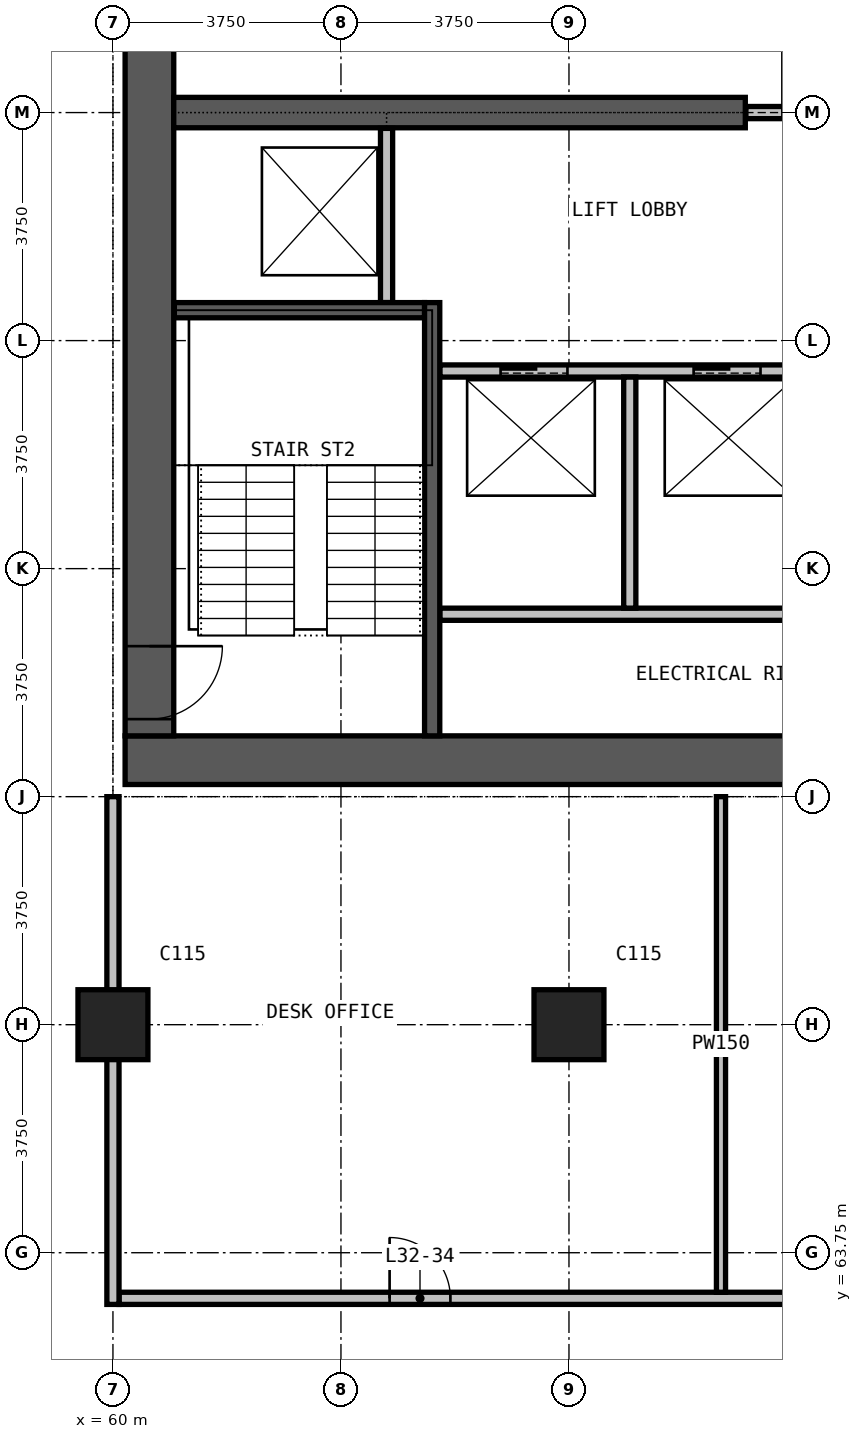
"""IFC4 building model, lengths in metres.
Left out: names, types, materials, properties, quantities, classifications, styles, units other than length and angle.
Written with IfcOpenShell. Run it as: python <this file> out.ifc"""

import sys

from ifc_helpers import new_model, si_unit, direction, frame, frame_2d, origin, origin_2d, place, context, subcontext, project, spatial, rectangle, extrude, element, fill, save


model = new_model("IFC4")
c1 = context("Model", 3, precision=1e-05, world=origin(), true_north=direction((0.0, 1.0)))
c2 = subcontext(c1, "Body", "Model", "MODEL_VIEW")
j1 = project(units=[si_unit("LENGTHUNIT", "METRE"), si_unit("PLANEANGLEUNIT", "RADIAN")], contexts=[c1])
p1 = place(None, origin())
s1 = spatial("IfcSite", under=j1, at=p1, CompositionType="ELEMENT")
p2 = place(p1, origin())
s2 = spatial("IfcBuilding", under=s1, at=p2, CompositionType="ELEMENT")
p3 = place(p2, frame((0.0, 0.0, 128.8)))
s3 = spatial("IfcBuildingStorey", under=s2, at=p3, CompositionType="ELEMENT", Elevation=128.8)
for number, where, z_axis, x_axis in (
    (1, (60.0, 67.5, 0.0), (0.0, 0.0, 1.0), (1.0, 0.0, 0.0)),
    (2, (67.5, 67.5, 0.0), (0.0, 0.0, 1.0), (1.0, 0.0, 0.0)),
):
    element("IfcColumn", number, at=place(p3, frame(where, z_axis=z_axis, x_axis=x_axis)), inside=s3, PredefinedType="COLUMN", context=c2, shape_type="SweptSolid", body=[
        extrude(rectangle(XDim=1.15, YDim=1.15, at=origin_2d()), origin(), (0.0, 0.0, 1.0), 3.6),
    ])
p4 = place(p3, frame((60.2, 71.85, 0.0), z_axis=(0.0, 0.0, 1.0), x_axis=(1.0, 0.0, 0.0)))
e3 = element("IfcWall", 3, at=p4, inside=s3, PredefinedType="SHEAR", context=c2, shape_type="SweptSolid", body=[
    extrude(rectangle(XDim=29.6, YDim=0.8, at=frame_2d((14.8, 0.0))), origin(), (0.0, 0.0, 1.0), 3.6),
])
p5 = place(p3, frame((60.6, 92.75, 0.0), z_axis=(0.0, 0.0, 1.0), x_axis=(0.0, -1.0, 0.0)))
e4 = element("IfcWall", 4, at=p5, inside=s3, PredefinedType="SHEAR", context=c2, shape_type="SweptSolid", body=[
    extrude(rectangle(XDim=20.5, YDim=0.8, at=frame_2d((10.25, 0.0))), origin(), (0.0, 0.0, 1.0), 3.6),
])
p6 = place(p5, frame((19.025, 0.0, 0.0)))
e5 = element("IfcOpeningElement", 5, at=p6, cuts=e4, PredefinedType="OPENING", context=c2, shape_type="SweptSolid", body=[
    extrude(rectangle(XDim=1.2, YDim=2.2, at=frame_2d((0.6, 1.1))), frame((0.0, 0.41, 0.0), z_axis=(0.0, -1.0, 0.0), x_axis=(1.0, 0.0, 0.0)), (0.0, 0.0, 1.0), 0.82),
])
p7 = place(p5, frame((8.025, 0.0, 0.0)))
e6 = element("IfcOpeningElement", 6, at=p7, cuts=e4, PredefinedType="OPENING", context=c2, shape_type="SweptSolid", body=[
    extrude(rectangle(XDim=1.2, YDim=2.2, at=frame_2d((0.6, 1.1))), frame((0.0, 0.41, 0.0), z_axis=(0.0, -1.0, 0.0), x_axis=(1.0, 0.0, 0.0)), (0.0, 0.0, 1.0), 0.82),
])
p8 = place(p3, frame((61.0, 82.5, 0.0), z_axis=(0.0, 0.0, 1.0), x_axis=(1.0, 0.0, 0.0)))
e7 = element("IfcWall", 7, at=p8, inside=s3, PredefinedType="SHEAR", context=c2, shape_type="SweptSolid", body=[
    extrude(rectangle(XDim=9.4, YDim=0.5, at=frame_2d((4.7, 0.0))), origin(), (0.0, 0.0, 1.0), 3.6),
])
p9 = place(p3, frame((70.41, 82.5, 0.0), z_axis=(0.0, 0.0, 1.0), x_axis=(1.0, 0.0, 0.0)))
e8 = element("IfcWall", 8, at=p9, inside=s3, PredefinedType="PARTITIONING", context=c2, shape_type="SweptSolid", body=[
    extrude(rectangle(XDim=2.38, YDim=0.2, at=frame_2d((1.19, 0.0))), origin(), (0.0, 0.0, 1.0), 2.4),
])
p10 = place(p9, frame((0.6, 0.0, 0.0)))
e9 = element("IfcOpeningElement", 9, at=p10, cuts=e8, PredefinedType="OPENING", context=c2, shape_type="SweptSolid", body=[
    extrude(rectangle(XDim=1.2, YDim=2.2, at=frame_2d((0.6, 1.1))), frame((0.0, 0.11, 0.0), z_axis=(0.0, -1.0, 0.0), x_axis=(1.0, 0.0, 0.0)), (0.0, 0.0, 1.0), 0.22),
])
p11 = place(p3, frame((60.1, 63.0, 0.0), z_axis=(0.0, 0.0, 1.0), x_axis=(1.0, 0.0, 0.0)))
e10 = element("IfcWall", 10, at=p11, inside=s3, PredefinedType="PARTITIONING", context=c2, shape_type="SweptSolid", body=[
    extrude(rectangle(XDim=29.8, YDim=0.2, at=frame_2d((14.9, 0.0))), origin(), (0.0, 0.0, 1.0), 3.3),
])
p12 = place(p11, frame((4.45, 0.0, 0.0)))
e11 = element("IfcOpeningElement", 11, at=p12, cuts=e10, PredefinedType="OPENING", context=c2, shape_type="SweptSolid", body=[
    extrude(rectangle(XDim=1.0, YDim=2.2, at=frame_2d((0.5, 1.1))), frame((0.0, 0.11, 0.0), z_axis=(0.0, -1.0, 0.0), x_axis=(1.0, 0.0, 0.0)), (0.0, 0.0, 1.0), 0.22),
])
p13 = place(p11, frame((16.05, 0.0, 0.0)))
e12 = element("IfcOpeningElement", 12, at=p13, cuts=e10, PredefinedType="OPENING", context=c2, shape_type="SweptSolid", body=[
    extrude(rectangle(XDim=1.0, YDim=2.2, at=frame_2d((0.5, 1.1))), frame((0.0, 0.11, 0.0), z_axis=(0.0, -1.0, 0.0), x_axis=(1.0, 0.0, 0.0)), (0.0, 0.0, 1.0), 0.22),
])
p14 = place(p3, frame((60.0, 62.9, 0.0), z_axis=(0.0, 0.0, 1.0), x_axis=(0.0, 1.0, 0.0)))
e13 = element("IfcWall", 13, at=p14, inside=s3, PredefinedType="PARTITIONING", context=c2, shape_type="SweptSolid", body=[
    extrude(rectangle(XDim=8.35, YDim=0.2, at=frame_2d((4.175, 0.0))), origin(), (0.0, 0.0, 1.0), 3.3),
])
p15 = place(p3, frame((70.0, 63.1, 0.0), z_axis=(0.0, 0.0, 1.0), x_axis=(0.0, 1.0, 0.0)))
e14 = element("IfcWall", 14, at=p15, inside=s3, PredefinedType="PARTITIONING", context=c2, shape_type="SweptSolid", body=[
    extrude(rectangle(XDim=8.15, YDim=0.15, at=frame_2d((4.075, 0.0))), origin(), (0.0, 0.0, 1.0), 3.3),
])
p16 = place(p3, frame((65.375, 74.25, 0.0), z_axis=(0.0, 0.0, 1.0), x_axis=(1.0, 0.0, 0.0)))
e15 = element("IfcWall", 15, at=p16, inside=s3, PredefinedType="PARTITIONING", context=c2, shape_type="SweptSolid", body=[
    extrude(rectangle(XDim=9.365, YDim=0.2, at=frame_2d((4.683, 0.0))), origin(), (0.0, 0.0, 1.0), 3.3),
])
p17 = place(p3, frame((65.375, 78.25, 0.0), z_axis=(0.0, 0.0, 1.0), x_axis=(1.0, 0.0, 0.0)))
e16 = element("IfcWall", 16, at=p17, inside=s3, PredefinedType="PARTITIONING", context=c2, shape_type="SweptSolid", body=[
    extrude(rectangle(XDim=9.365, YDim=0.2, at=frame_2d((4.683, 0.0))), origin(), (0.0, 0.0, 1.0), 3.3),
])
p18 = place(p17, frame((1.0, 0.0, 0.0)))
e17 = element("IfcOpeningElement", 17, at=p18, cuts=e16, PredefinedType="OPENING", context=c2, shape_type="SweptSolid", body=[
    extrude(rectangle(XDim=1.1, YDim=2.2, at=frame_2d((0.55, 1.1))), frame((0.0, 0.11, 0.0), z_axis=(0.0, -1.0, 0.0), x_axis=(1.0, 0.0, 0.0)), (0.0, 0.0, 1.0), 0.22),
])
p19 = place(p17, frame((4.175, 0.0, 0.0)))
e18 = element("IfcOpeningElement", 18, at=p19, cuts=e16, PredefinedType="OPENING", context=c2, shape_type="SweptSolid", body=[
    extrude(rectangle(XDim=1.1, YDim=2.2, at=frame_2d((0.55, 1.1))), frame((0.0, 0.11, 0.0), z_axis=(0.0, -1.0, 0.0), x_axis=(1.0, 0.0, 0.0)), (0.0, 0.0, 1.0), 0.22),
])
p20 = place(p17, frame((7.325, 0.0, 0.0)))
e19 = element("IfcOpeningElement", 19, at=p20, cuts=e16, PredefinedType="OPENING", context=c2, shape_type="SweptSolid", body=[
    extrude(rectangle(XDim=1.1, YDim=2.2, at=frame_2d((0.55, 1.1))), frame((0.0, 0.11, 0.0), z_axis=(0.0, -1.0, 0.0), x_axis=(1.0, 0.0, 0.0)), (0.0, 0.0, 1.0), 0.22),
])
p21 = place(p3, frame((64.5, 79.375, 0.0), z_axis=(0.0, 0.0, 1.0), x_axis=(0.0, 1.0, 0.0)))
e20 = element("IfcWall", 20, at=p21, inside=s3, PredefinedType="PARTITIONING", context=c2, shape_type="SweptSolid", body=[
    extrude(rectangle(XDim=2.865, YDim=0.2, at=frame_2d((1.433, 0.0))), origin(), (0.0, 0.0, 1.0), 3.3),
])
p22 = place(p3, frame((68.5, 74.35, 0.0), z_axis=(0.0, 0.0, 1.0), x_axis=(0.0, 1.0, 0.0)))
e21 = element("IfcWall", 21, at=p22, inside=s3, PredefinedType="PARTITIONING", context=c2, shape_type="SweptSolid", body=[
    extrude(rectangle(XDim=3.8, YDim=0.2, at=frame_2d((1.9, 0.0))), origin(), (0.0, 0.0, 1.0), 3.3),
])
p23 = place(p3, frame((61.01, 79.25, 0.0), z_axis=(0.0, 0.0, 1.0), x_axis=(1.0, 0.0, 0.0)))
e22 = element("IfcWall", 22, at=p23, inside=s3, PredefinedType="PARTITIONING", context=c2, shape_type="SweptSolid", body=[
    extrude(rectangle(XDim=4.115, YDim=0.25, at=frame_2d((2.058, 0.0))), origin(), (0.0, 0.0, 1.0), 3.3),
])
p24 = place(p3, frame((65.25, 72.25, 0.0), z_axis=(0.0, 0.0, 1.0), x_axis=(0.0, 1.0, 0.0)))
e23 = element("IfcWall", 23, at=p24, inside=s3, PredefinedType="PARTITIONING", context=c2, shape_type="SweptSolid", body=[
    extrude(rectangle(XDim=7.125, YDim=0.25, at=frame_2d((3.562, 0.0))), origin(), (0.0, 0.0, 1.0), 3.3),
])
p25 = place(p18, origin())
e24 = element("IfcDoor", 24, at=p25, inside=s3, OperationType="DOUBLE_DOOR_SLIDING", PredefinedType="DOOR", context=c2, shape_type="SweptSolid", body=[
    extrude(rectangle(XDim=1.1, YDim=2.2, at=frame_2d((0.55, 1.1))), frame((0.0, 0.025, 0.0), z_axis=(0.0, -1.0, 0.0), x_axis=(1.0, 0.0, 0.0)), (0.0, 0.0, 1.0), 0.05),
])
fill(e17, e24)
p26 = place(p19, origin())
e25 = element("IfcDoor", 25, at=p26, inside=s3, OperationType="DOUBLE_DOOR_SLIDING", PredefinedType="DOOR", context=c2, shape_type="SweptSolid", body=[
    extrude(rectangle(XDim=1.1, YDim=2.2, at=frame_2d((0.55, 1.1))), frame((0.0, 0.025, 0.0), z_axis=(0.0, -1.0, 0.0), x_axis=(1.0, 0.0, 0.0)), (0.0, 0.0, 1.0), 0.05),
])
fill(e18, e25)
p27 = place(p6, origin())
e26 = element("IfcDoor", 26, at=p27, inside=s3, OperationType="SINGLE_SWING_LEFT", PredefinedType="DOOR", context=c2, shape_type="SweptSolid", body=[
    extrude(rectangle(XDim=1.2, YDim=2.2, at=frame_2d((0.6, 1.1))), frame((0.0, 0.025, 0.0), z_axis=(0.0, -1.0, 0.0), x_axis=(1.0, 0.0, 0.0)), (0.0, 0.0, 1.0), 0.05),
])
fill(e5, e26)
p28 = place(p12, origin())
e27 = element("IfcDoor", 27, at=p28, inside=s3, OperationType="SINGLE_SWING_LEFT", PredefinedType="DOOR", context=c2, shape_type="SweptSolid", body=[
    extrude(rectangle(XDim=1.0, YDim=2.2, at=frame_2d((0.5, 1.1))), frame((0.0, 0.025, 0.0), z_axis=(0.0, -1.0, 0.0), x_axis=(1.0, 0.0, 0.0)), (0.0, 0.0, 1.0), 0.05),
])
fill(e11, e27)
save(model, sys.argv[1])
